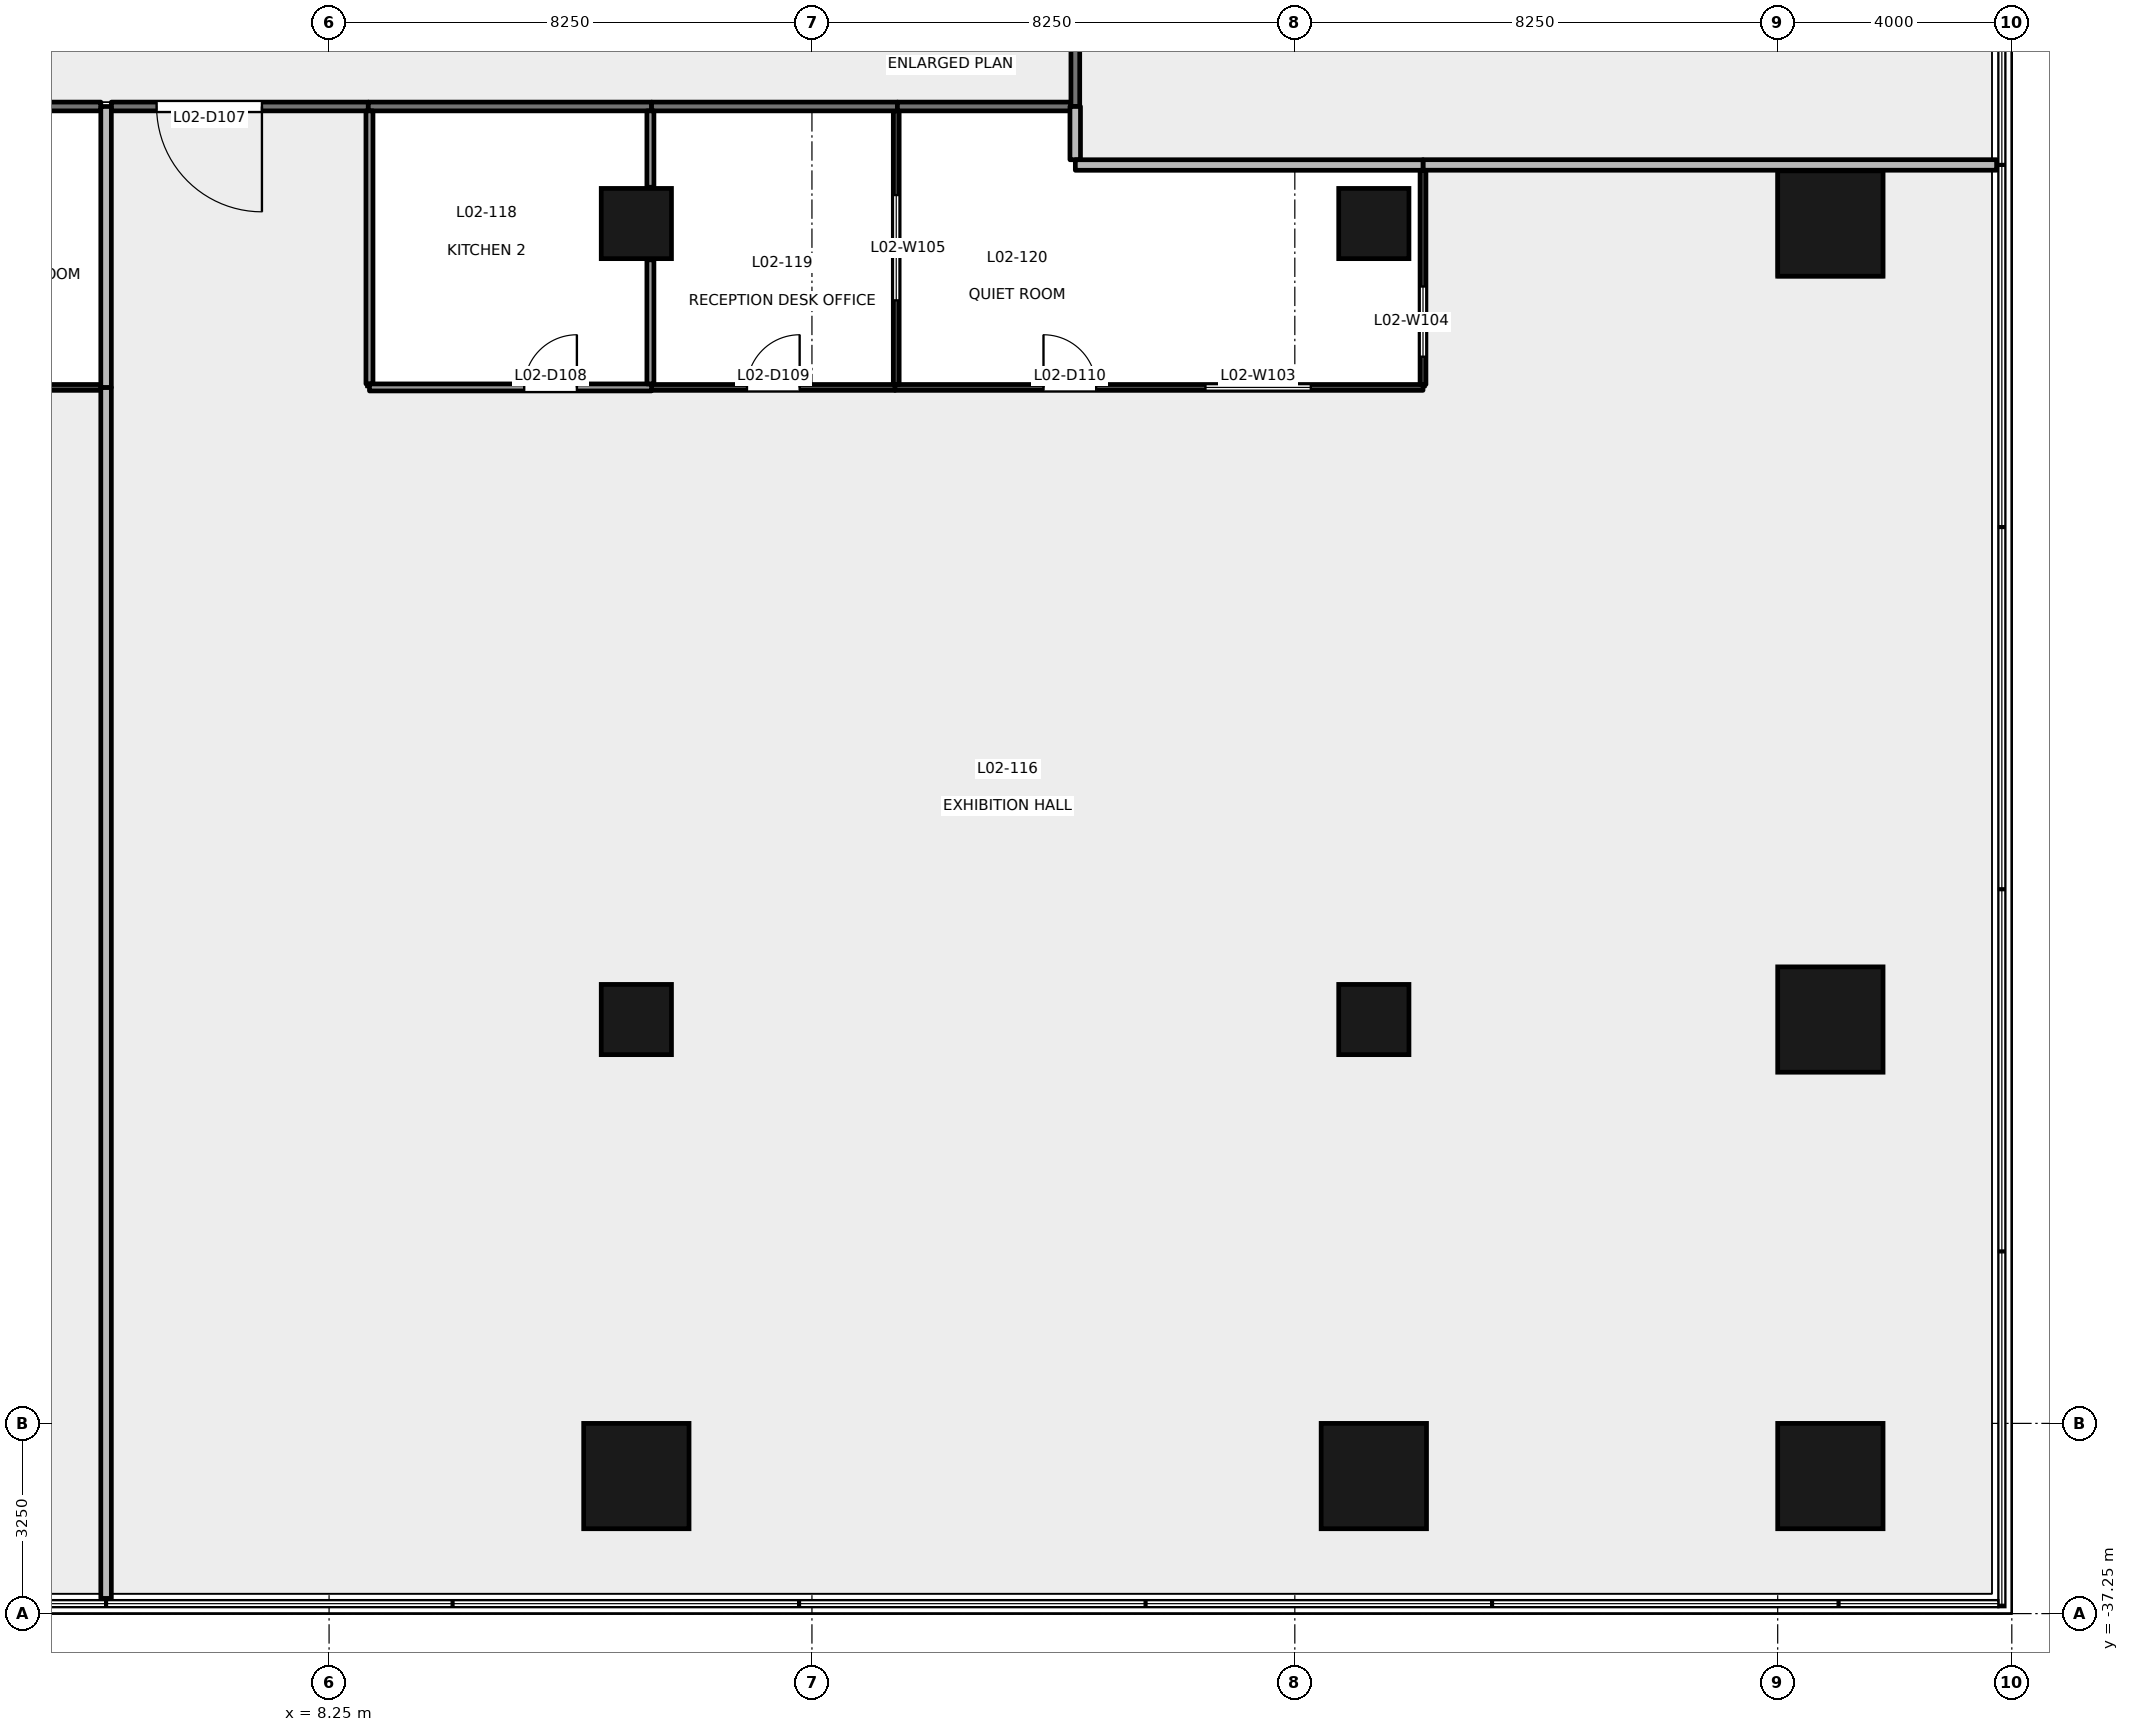
"""IFC4 building model, lengths in metres.
Left out: names, types, materials, properties, quantities, classifications, styles, units other than length and angle.
Written with IfcOpenShell. Run it as: python <this file> out.ifc"""

import sys

from ifc_helpers import new_model, si_unit, direction, frame, frame_2d, origin, origin_2d, place, context, subcontext, project, spatial, rectangle, extrude, element, fill, save


model = new_model("IFC4")
c1 = context("Model", 3, precision=1e-05, world=origin(), true_north=direction((0.0, 1.0)))
c2 = subcontext(c1, "Body", "Model", "MODEL_VIEW")
j1 = project(units=[si_unit("LENGTHUNIT", "METRE"), si_unit("PLANEANGLEUNIT", "RADIAN")], contexts=[c1])
p1 = place(None, origin())
s1 = spatial("IfcSite", under=j1, at=p1, CompositionType="ELEMENT")
p2 = place(p1, origin())
s2 = spatial("IfcBuilding", under=s1, at=p2, CompositionType="ELEMENT")
p3 = place(p2, frame((0.0, 0.0, 12.6)))
s3 = spatial("IfcBuildingStorey", under=s2, at=p3, CompositionType="ELEMENT", Elevation=12.6)
for number, where, z_axis, x_axis in (
    (1, (33.9, -34.9, -0.2), (0.0, 0.0, 1.0), (1.0, 0.0, 0.0)),
    (2, (13.5, -34.9, -0.2), (0.0, 0.0, 1.0), (1.0, 0.0, 0.0)),
    (3, (26.1, -34.9, -0.2), (0.0, 0.0, 1.0), (1.0, 0.0, 0.0)),
    (4, (33.9, -27.1, -0.2), (0.0, 0.0, 1.0), (0.0, 1.0, 0.0)),
    (5, (33.9, -13.5, -0.2), (0.0, 0.0, 1.0), (0.0, 1.0, 0.0)),
):
    element("IfcColumn", number, at=place(p3, frame(where, z_axis=z_axis, x_axis=x_axis)), inside=s3, PredefinedType="COLUMN", context=c2, shape_type="SweptSolid", body=[
        extrude(rectangle(XDim=1.8, YDim=1.8, at=origin_2d()), origin(), (0.0, 0.0, 1.0), 4.8),
    ])
for number, where, z_axis, x_axis in (
    (6, (13.5, -27.1, -0.2), (0.0, 0.0, 1.0), (1.0, 0.0, 0.0)),
    (7, (26.1, -27.1, -0.2), (0.0, 0.0, 1.0), (1.0, 0.0, 0.0)),
    (8, (13.5, -13.5, -0.2), (0.0, 0.0, 1.0), (1.0, 0.0, 0.0)),
    (9, (26.1, -13.5, -0.2), (0.0, 0.0, 1.0), (1.0, 0.0, 0.0)),
):
    element("IfcColumn", number, at=place(p3, frame(where, z_axis=z_axis, x_axis=x_axis)), inside=s3, PredefinedType="COLUMN", context=c2, shape_type="SweptSolid", body=[
        extrude(rectangle(XDim=1.2, YDim=1.2, at=origin_2d()), origin(), (0.0, 0.0, 1.0), 4.8),
    ])
p4 = place(p3, frame((4.35, -11.5, 0.0), z_axis=(0.0, 0.0, 1.0), x_axis=(-1.0, 0.0, 0.0)))
e10 = element("IfcWall", 10, at=p4, inside=s3, PredefinedType="PARTITIONING", context=c2, shape_type="SweptSolid", body=[
    extrude(rectangle(XDim=2.99, YDim=0.15, at=frame_2d((1.495, 0.0))), origin(), (0.0, 0.0, 1.0), 4.6),
])
p5 = place(p3, frame((8.92, -11.5, 0.0), z_axis=(0.0, 0.0, 1.0), x_axis=(-1.0, 0.0, 0.0)))
e11 = element("IfcWall", 11, at=p5, inside=s3, PredefinedType="PARTITIONING", context=c2, shape_type="SweptSolid", body=[
    extrude(rectangle(XDim=4.39, YDim=0.15, at=frame_2d((2.195, 0.0))), origin(), (0.0, 0.0, 1.0), 4.3),
])
p6 = place(p5, frame((1.817, 0.0, 0.0)))
e12 = element("IfcOpeningElement", 12, at=p6, cuts=e11, PredefinedType="OPENING", context=c2, shape_type="SweptSolid", body=[
    extrude(rectangle(XDim=1.8, YDim=2.1, at=frame_2d((0.9, 1.05))), frame((0.0, 0.085, 0.0), z_axis=(0.0, -1.0, 0.0), x_axis=(1.0, 0.0, 0.0)), (0.0, 0.0, 1.0), 0.171),
])
p7 = place(p3, frame((13.76, -11.5, 0.0), z_axis=(0.0, 0.0, 1.0), x_axis=(-1.0, 0.0, 0.0)))
e13 = element("IfcWall", 13, at=p7, inside=s3, PredefinedType="PARTITIONING", context=c2, shape_type="SweptSolid", body=[
    extrude(rectangle(XDim=4.84, YDim=0.15, at=frame_2d((2.42, 0.0))), origin(), (0.0, 0.0, 1.0), 3.2),
])
p8 = place(p3, frame((17.96, -11.5, 0.0), z_axis=(0.0, 0.0, 1.0), x_axis=(-1.0, 0.0, 0.0)))
e14 = element("IfcWall", 14, at=p8, inside=s3, PredefinedType="PARTITIONING", context=c2, shape_type="SweptSolid", body=[
    extrude(rectangle(XDim=4.2, YDim=0.15, at=frame_2d((2.1, 0.0))), origin(), (0.0, 0.0, 1.0), 4.3),
])
p9 = place(p3, frame((20.925, -11.5, 0.0), z_axis=(0.0, 0.0, 1.0), x_axis=(-1.0, 0.0, 0.0)))
e15 = element("IfcWall", 15, at=p9, inside=s3, PredefinedType="PARTITIONING", context=c2, shape_type="SweptSolid", body=[
    extrude(rectangle(XDim=2.965, YDim=0.15, at=frame_2d((1.482, 0.0))), origin(), (0.0, 0.0, 1.0), 4.3),
])
p10 = place(p3, frame((21.0, -7.4, 0.0), z_axis=(0.0, 0.0, 1.0), x_axis=(0.0, -1.0, 0.0)))
e16 = element("IfcWall", 16, at=p10, inside=s3, PredefinedType="PARTITIONING", context=c2, shape_type="SweptSolid", body=[
    extrude(rectangle(XDim=4.1, YDim=0.15, at=frame_2d((2.05, 0.0))), origin(), (0.0, 0.0, 1.0), 4.6),
])
p11 = place(p10, frame((0.7, 0.0, 0.0)))
e17 = element("IfcOpeningElement", 17, at=p11, cuts=e16, PredefinedType="OPENING", context=c2, shape_type="SweptSolid", body=[
    extrude(rectangle(XDim=1.8, YDim=2.1, at=frame_2d((0.9, 1.05))), frame((0.0, 0.085, 0.0), z_axis=(0.0, -1.0, 0.0), x_axis=(1.0, 0.0, 0.0)), (0.0, 0.0, 1.0), 0.171),
])
p12 = place(p3, frame((1.36, -16.3, 0.0), z_axis=(0.0, 0.0, 1.0), x_axis=(1.0, 0.0, 0.0)))
e18 = element("IfcWall", 18, at=p12, inside=s3, PredefinedType="PARTITIONING", context=c2, shape_type="SweptSolid", body=[
    extrude(rectangle(XDim=2.99, YDim=0.1, at=frame_2d((1.495, 0.0))), origin(), (0.0, 0.0, 1.0), 4.6),
])
p13 = place(p12, frame((1.095, 0.0, 0.0)))
e19 = element("IfcOpeningElement", 19, at=p13, cuts=e18, PredefinedType="OPENING", context=c2, shape_type="SweptSolid", body=[
    extrude(rectangle(XDim=0.8, YDim=2.1, at=frame_2d((0.4, 1.05))), frame((0.0, 0.061, 0.0), z_axis=(0.0, -1.0, 0.0), x_axis=(1.0, 0.0, 0.0)), (0.0, 0.0, 1.0), 0.121),
])
p14 = place(p3, frame((4.44, -16.3, 0.0), z_axis=(0.0, 0.0, 1.0), x_axis=(0.0, -1.0, 0.0)))
e20 = element("IfcWall", 20, at=p14, inside=s3, PredefinedType="PARTITIONING", context=c2, shape_type="SweptSolid", body=[
    extrude(rectangle(XDim=20.69, YDim=0.18, at=frame_2d((10.345, 0.0))), origin(), (0.0, 0.0, 1.0), 3.6),
])
p15 = place(p3, frame((4.44, -11.5, 0.0), z_axis=(0.0, 0.0, 1.0), x_axis=(0.0, -1.0, 0.0)))
e21 = element("IfcWall", 21, at=p15, inside=s3, PredefinedType="PARTITIONING", context=c2, shape_type="SweptSolid", body=[
    extrude(rectangle(XDim=4.8, YDim=0.18, at=frame_2d((2.4, 0.0))), origin(), (0.0, 0.0, 1.0), 3.6),
])
p16 = place(p3, frame((8.94, -11.575, 0.0), z_axis=(0.0, 0.0, 1.0), x_axis=(0.0, -1.0, 0.0)))
e22 = element("IfcWall", 22, at=p16, inside=s3, PredefinedType="PARTITIONING", context=c2, shape_type="SweptSolid", body=[
    extrude(rectangle(XDim=4.665, YDim=0.12, at=frame_2d((2.333, 0.0))), origin(), (0.0, 0.0, 1.0), 3.6),
])
p17 = place(p3, frame((8.94, -16.3, 0.0), z_axis=(0.0, 0.0, 1.0), x_axis=(1.0, 0.0, 0.0)))
e23 = element("IfcWall", 23, at=p17, inside=s3, PredefinedType="PARTITIONING", context=c2, shape_type="SweptSolid", body=[
    extrude(rectangle(XDim=4.82, YDim=0.12, at=frame_2d((2.41, 0.0))), origin(), (0.0, 0.0, 1.0), 3.6),
])
p18 = place(p17, frame((2.644, 0.0, 0.0)))
e24 = element("IfcOpeningElement", 24, at=p18, cuts=e23, PredefinedType="OPENING", context=c2, shape_type="SweptSolid", body=[
    extrude(rectangle(XDim=0.9, YDim=2.1, at=frame_2d((0.45, 1.05))), frame((0.0, 0.071, 0.0), z_axis=(0.0, -1.0, 0.0), x_axis=(1.0, 0.0, 0.0)), (0.0, 0.0, 1.0), 0.141),
])
p19 = place(p3, frame((13.76, -16.3, 0.0), z_axis=(0.0, 0.0, 1.0), x_axis=(1.0, 0.0, 0.0)))
e25 = element("IfcWall", 25, at=p19, inside=s3, PredefinedType="PARTITIONING", context=c2, shape_type="SweptSolid", body=[
    extrude(rectangle(XDim=4.16, YDim=0.1, at=frame_2d((2.08, 0.0))), origin(), (0.0, 0.0, 1.0), 3.99),
])
p20 = place(p19, frame((1.63, 0.0, 0.0)))
e26 = element("IfcOpeningElement", 26, at=p20, cuts=e25, PredefinedType="OPENING", context=c2, shape_type="SweptSolid", body=[
    extrude(rectangle(XDim=0.9, YDim=2.1, at=frame_2d((0.45, 1.05))), frame((0.0, 0.061, 0.0), z_axis=(0.0, -1.0, 0.0), x_axis=(1.0, 0.0, 0.0)), (0.0, 0.0, 1.0), 0.121),
])
p21 = place(p3, frame((17.92, -16.3, 0.0), z_axis=(0.0, 0.0, 1.0), x_axis=(1.0, 0.0, 0.0)))
e27 = element("IfcWall", 27, at=p21, inside=s3, PredefinedType="PARTITIONING", context=c2, shape_type="SweptSolid", body=[
    extrude(rectangle(XDim=9.02, YDim=0.1, at=frame_2d((4.51, 0.0))), origin(), (0.0, 0.0, 1.0), 3.6),
])
p22 = place(p21, frame((2.536, 0.0, 0.0)))
e28 = element("IfcOpeningElement", 28, at=p22, cuts=e27, PredefinedType="OPENING", context=c2, shape_type="SweptSolid", body=[
    extrude(rectangle(XDim=0.9, YDim=2.1, at=frame_2d((0.45, 1.05))), frame((0.0, 0.061, 0.0), z_axis=(0.0, -1.0, 0.0), x_axis=(1.0, 0.0, 0.0)), (0.0, 0.0, 1.0), 0.121),
])
p23 = place(p21, frame((5.303, 0.0, 0.9)))
e29 = element("IfcOpeningElement", 29, at=p23, cuts=e27, PredefinedType="OPENING", context=c2, shape_type="SweptSolid", body=[
    extrude(rectangle(XDim=1.8, YDim=1.2, at=frame_2d((0.9, 0.6))), frame((0.0, 0.061, 0.0), z_axis=(0.0, -1.0, 0.0), x_axis=(1.0, 0.0, 0.0)), (0.0, 0.0, 1.0), 0.121),
])
p24 = place(p3, frame((26.94, -16.25, 0.0), z_axis=(0.0, 0.0, 1.0), x_axis=(0.0, 1.0, 0.0)))
e30 = element("IfcWall", 30, at=p24, inside=s3, PredefinedType="PARTITIONING", context=c2, shape_type="SweptSolid", body=[
    extrude(rectangle(XDim=3.66, YDim=0.1, at=frame_2d((1.83, 0.0))), origin(), (0.0, 0.0, 1.0), 3.6),
])
p25 = place(p24, frame((0.475, 0.0, 0.9)))
e31 = element("IfcOpeningElement", 31, at=p25, cuts=e30, PredefinedType="OPENING", context=c2, shape_type="SweptSolid", body=[
    extrude(rectangle(XDim=1.2, YDim=1.2, at=frame_2d((0.6, 0.6))), frame((0.0, 0.061, 0.0), z_axis=(0.0, -1.0, 0.0), x_axis=(1.0, 0.0, 0.0)), (0.0, 0.0, 1.0), 0.121),
])
p26 = place(p3, frame((26.94, -12.499, 0.0), z_axis=(0.0, 0.0, 1.0), x_axis=(1.0, 0.0, 0.0)))
e32 = element("IfcWall", 32, at=p26, inside=s3, PredefinedType="PARTITIONING", context=c2, shape_type="SweptSolid", body=[
    extrude(rectangle(XDim=9.8, YDim=0.18, at=frame_2d((4.9, 0.0))), origin(), (0.0, 0.0, 1.0), 3.6),
])
p27 = place(p3, frame((13.74, -11.575, 0.0), z_axis=(0.0, 0.0, 1.0), x_axis=(0.0, -1.0, 0.0)))
e33 = element("IfcWall", 33, at=p27, inside=s3, PredefinedType="PARTITIONING", context=c2, shape_type="SweptSolid", body=[
    extrude(rectangle(XDim=1.305, YDim=0.12, at=frame_2d((0.652, 0.0))), origin(), (0.0, 0.0, 1.0), 3.2),
])
p28 = place(p3, frame((13.74, -14.12, 0.0), z_axis=(0.0, 0.0, 1.0), x_axis=(0.0, -1.0, 0.0)))
e34 = element("IfcWall", 34, at=p28, inside=s3, PredefinedType="PARTITIONING", context=c2, shape_type="SweptSolid", body=[
    extrude(rectangle(XDim=2.12, YDim=0.12, at=frame_2d((1.06, 0.0))), origin(), (0.0, 0.0, 1.0), 3.6),
])
p29 = place(p3, frame((17.94, -11.575, 0.0), z_axis=(0.0, 0.0, 1.0), x_axis=(0.0, -1.0, 0.0)))
e35 = element("IfcWall", 35, at=p29, inside=s3, PredefinedType="PARTITIONING", context=c2, shape_type="SweptSolid", body=[
    extrude(rectangle(XDim=4.675, YDim=0.1, at=frame_2d((2.337, 0.0))), origin(), (0.0, 0.0, 1.0), 3.6),
])
p30 = place(p29, frame((1.438, 0.0, 0.9)))
e36 = element("IfcOpeningElement", 36, at=p30, cuts=e35, PredefinedType="OPENING", context=c2, shape_type="SweptSolid", body=[
    extrude(rectangle(XDim=1.8, YDim=1.2, at=frame_2d((0.9, 0.6))), frame((0.0, 0.061, 0.0), z_axis=(0.0, -1.0, 0.0), x_axis=(1.0, 0.0, 0.0)), (0.0, 0.0, 1.0), 0.121),
])
p31 = place(p3, frame((20.998, -11.5, 0.0), z_axis=(0.0, 0.0, 1.0), x_axis=(0.0, -1.0, 0.0)))
e37 = element("IfcWall", 37, at=p31, inside=s3, PredefinedType="PARTITIONING", context=c2, shape_type="SweptSolid", body=[
    extrude(rectangle(XDim=0.91, YDim=0.18, at=frame_2d((0.455, 0.0))), origin(), (0.0, 0.0, 1.0), 4.6),
])
p32 = place(p3, frame((21.0, -12.5, 0.0), z_axis=(0.0, 0.0, 1.0), x_axis=(1.0, 0.0, 0.0)))
e38 = element("IfcWall", 38, at=p32, inside=s3, PredefinedType="PARTITIONING", context=c2, shape_type="SweptSolid", body=[
    extrude(rectangle(XDim=5.94, YDim=0.18, at=frame_2d((2.97, 0.0))), origin(), (0.0, 0.0, 1.0), 3.4),
])
p33 = place(p6, origin())
e39 = element("IfcDoor", 39, at=p33, inside=s3, OperationType="DOUBLE_DOOR_SINGLE_SWING", PredefinedType="DOOR", context=c2, shape_type="SweptSolid", body=[
    extrude(rectangle(XDim=1.8, YDim=2.1, at=frame_2d((0.9, 1.05))), frame((0.0, 0.025, 0.0), z_axis=(0.0, -1.0, 0.0), x_axis=(1.0, 0.0, 0.0)), (0.0, 0.0, 1.0), 0.05),
])
fill(e12, e39)
p34 = place(p18, origin())
e40 = element("IfcDoor", 40, at=p34, inside=s3, OperationType="SINGLE_SWING_RIGHT", PredefinedType="DOOR", context=c2, shape_type="SweptSolid", body=[
    extrude(rectangle(XDim=0.9, YDim=2.1, at=frame_2d((0.45, 1.05))), frame((0.0, 0.025, 0.0), z_axis=(0.0, -1.0, 0.0), x_axis=(1.0, 0.0, 0.0)), (0.0, 0.0, 1.0), 0.05),
])
fill(e24, e40)
p35 = place(p20, origin())
e41 = element("IfcDoor", 41, at=p35, inside=s3, OperationType="SINGLE_SWING_RIGHT", PredefinedType="DOOR", context=c2, shape_type="SweptSolid", body=[
    extrude(rectangle(XDim=0.9, YDim=2.1, at=frame_2d((0.45, 1.05))), frame((0.0, 0.025, 0.0), z_axis=(0.0, -1.0, 0.0), x_axis=(1.0, 0.0, 0.0)), (0.0, 0.0, 1.0), 0.05),
])
fill(e26, e41)
p36 = place(p22, origin())
e42 = element("IfcDoor", 42, at=p36, inside=s3, OperationType="SINGLE_SWING_LEFT", PredefinedType="DOOR", context=c2, shape_type="SweptSolid", body=[
    extrude(rectangle(XDim=0.9, YDim=2.1, at=frame_2d((0.45, 1.05))), frame((0.0, 0.025, 0.0), z_axis=(0.0, -1.0, 0.0), x_axis=(1.0, 0.0, 0.0)), (0.0, 0.0, 1.0), 0.05),
])
fill(e28, e42)
p37 = place(p23, origin())
e43 = element("IfcWindow", 43, at=p37, inside=s3, PartitioningType="SINGLE_PANEL", PredefinedType="WINDOW", context=c2, shape_type="SweptSolid", body=[
    extrude(rectangle(XDim=1.8, YDim=1.2, at=frame_2d((0.9, 0.6))), frame((0.0, 0.03, 0.0), z_axis=(0.0, -1.0, 0.0), x_axis=(1.0, 0.0, 0.0)), (0.0, 0.0, 1.0), 0.06),
])
fill(e29, e43)
p38 = place(p25, origin())
e44 = element("IfcWindow", 44, at=p38, inside=s3, PartitioningType="SINGLE_PANEL", PredefinedType="WINDOW", context=c2, shape_type="SweptSolid", body=[
    extrude(rectangle(XDim=1.2, YDim=1.2, at=frame_2d((0.6, 0.6))), frame((0.0, 0.03, 0.0), z_axis=(0.0, -1.0, 0.0), x_axis=(1.0, 0.0, 0.0)), (0.0, 0.0, 1.0), 0.06),
])
fill(e31, e44)
p39 = place(p30, origin())
e45 = element("IfcWindow", 45, at=p39, inside=s3, PartitioningType="SINGLE_PANEL", PredefinedType="WINDOW", context=c2, shape_type="SweptSolid", body=[
    extrude(rectangle(XDim=1.8, YDim=1.2, at=frame_2d((0.9, 0.6))), frame((0.0, 0.03, 0.0), z_axis=(0.0, -1.0, 0.0), x_axis=(1.0, 0.0, 0.0)), (0.0, 0.0, 1.0), 0.06),
])
fill(e36, e45)
save(model, sys.argv[1])
